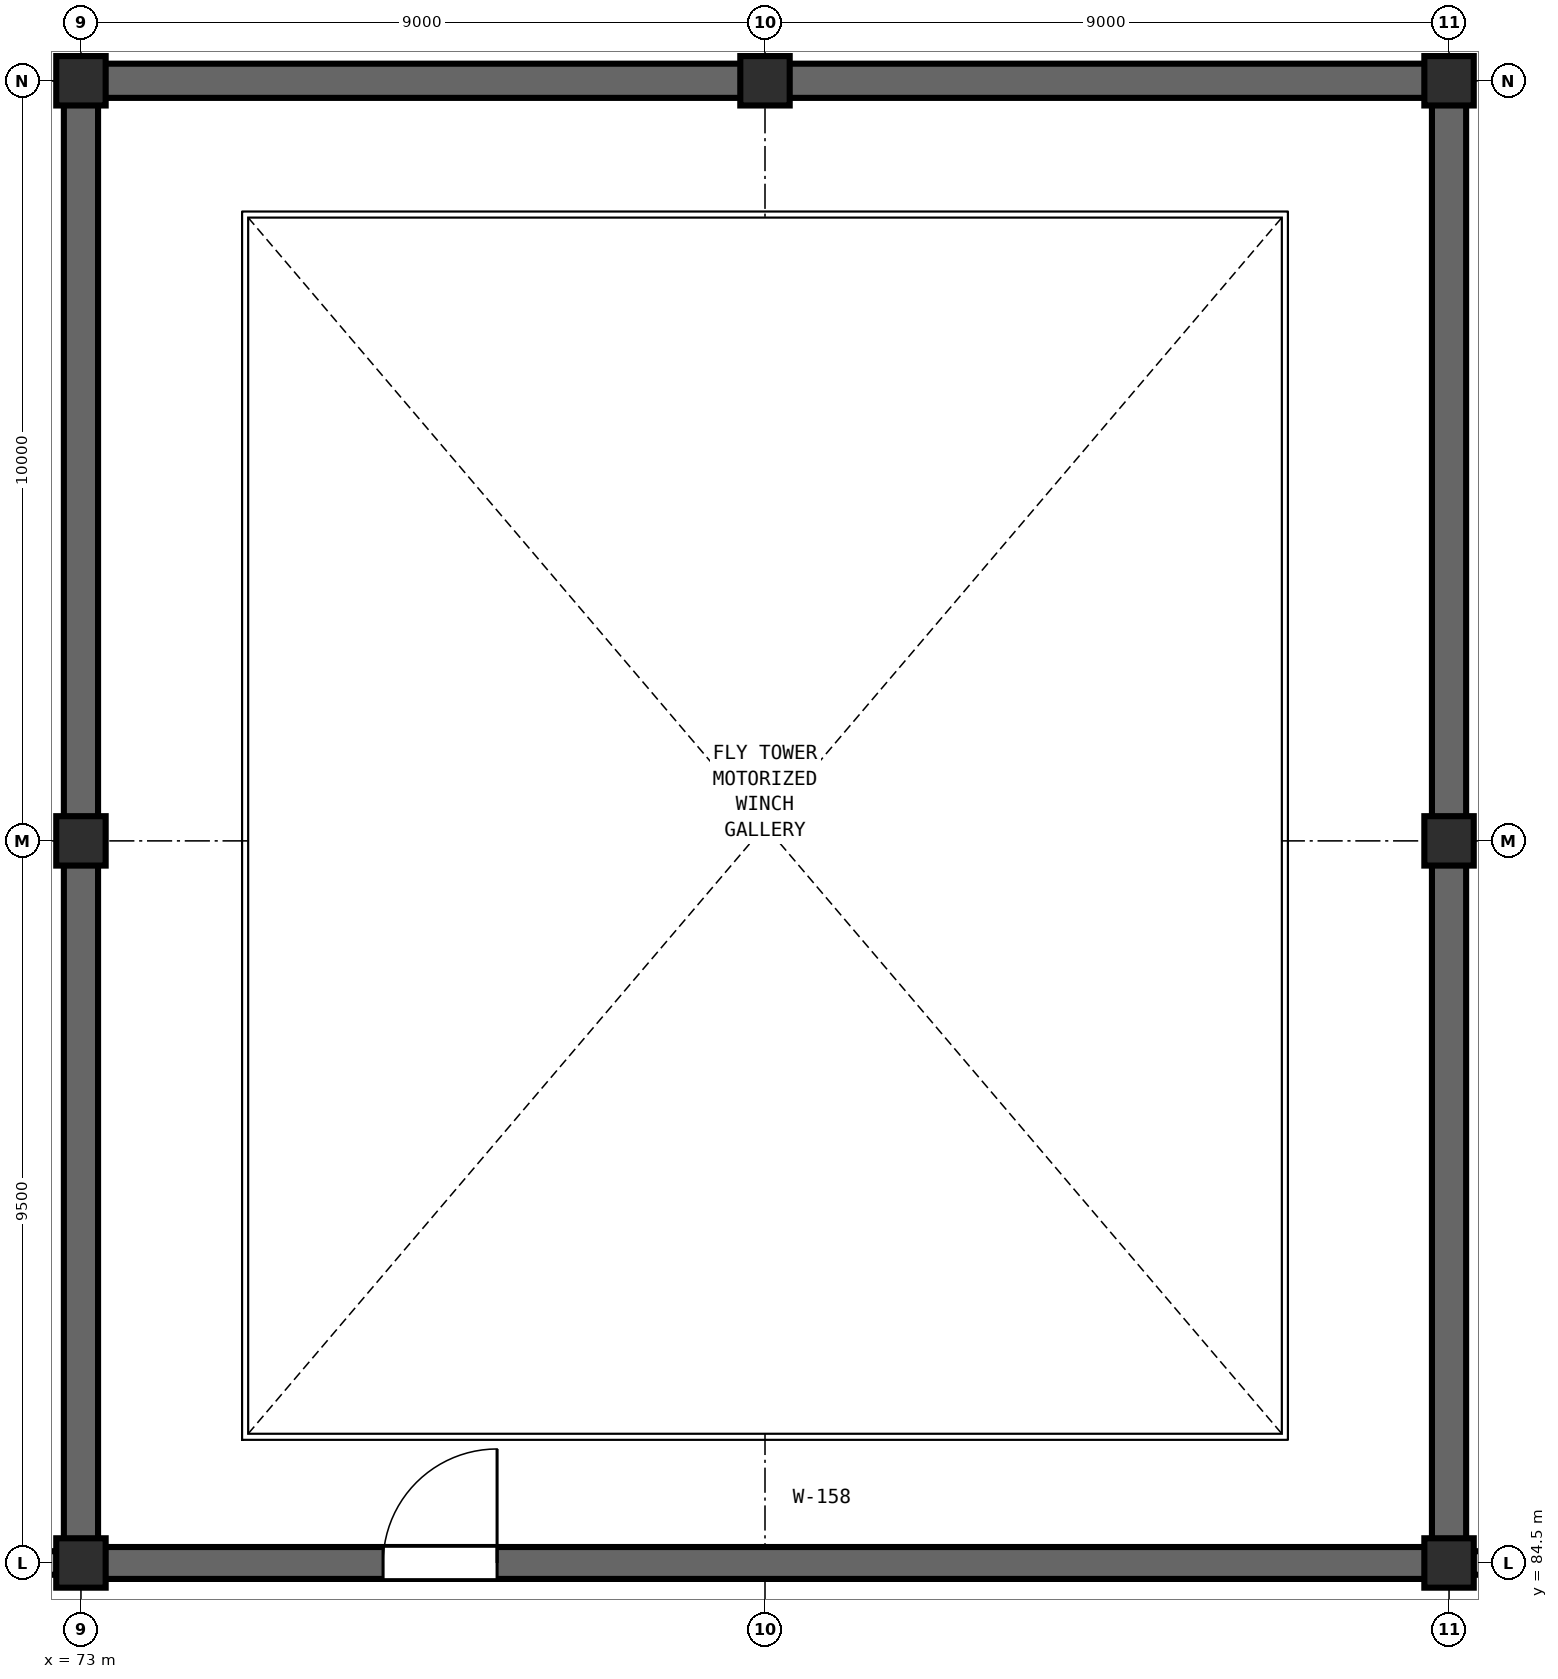
"""IFC4 building model, lengths in metres.
Left out: names, types, materials, properties, quantities, classifications, styles, units other than length and angle.
Written with IfcOpenShell. Run it as: python <this file> out.ifc"""

import sys

from ifc_helpers import new_model, si_unit, direction, frame, frame_2d, origin, origin_2d, place, context, subcontext, project, spatial, rectangle, extrude, element, fill, save


model = new_model("IFC4")
c1 = context("Model", 3, precision=1e-05, world=origin(), true_north=direction((0.0, 1.0)))
c2 = subcontext(c1, "Body", "Model", "MODEL_VIEW")
j1 = project(units=[si_unit("LENGTHUNIT", "METRE"), si_unit("PLANEANGLEUNIT", "RADIAN")], contexts=[c1])
p1 = place(None, origin())
s1 = spatial("IfcSite", under=j1, at=p1, CompositionType="ELEMENT")
p2 = place(p1, origin())
s2 = spatial("IfcBuilding", under=s1, at=p2, CompositionType="ELEMENT")
p3 = place(p2, frame((0.0, 0.0, 19.2)))
s3 = spatial("IfcBuildingStorey", under=s2, at=p3, CompositionType="ELEMENT", Elevation=19.2)
for number, where, z_axis, x_axis in (
    (1, (73.0, 84.5, 0.0), (0.0, 0.0, 1.0), (1.0, 0.0, 0.0)),
    (2, (73.0, 94.0, 0.0), (0.0, 0.0, 1.0), (1.0, 0.0, 0.0)),
    (3, (73.0, 104.0, 0.0), (0.0, 0.0, 1.0), (1.0, 0.0, 0.0)),
    (4, (82.0, 104.0, 0.0), (0.0, 0.0, 1.0), (1.0, 0.0, 0.0)),
    (5, (91.0, 84.5, 0.0), (0.0, 0.0, 1.0), (1.0, 0.0, 0.0)),
    (6, (91.0, 94.0, 0.0), (0.0, 0.0, 1.0), (1.0, 0.0, 0.0)),
    (7, (91.0, 104.0, 0.0), (0.0, 0.0, 1.0), (1.0, 0.0, 0.0)),
):
    element("IfcColumn", number, at=place(p3, frame(where, z_axis=z_axis, x_axis=x_axis)), inside=s3, PredefinedType="COLUMN", context=c2, shape_type="SweptSolid", body=[
        extrude(rectangle(XDim=0.65, YDim=0.65, at=origin_2d()), origin(), (0.0, 0.0, 1.0), 4.25),
    ])
p4 = place(p3, frame((72.775, 104.0, 0.0), z_axis=(0.0, 0.0, 1.0), x_axis=(1.0, 0.0, 0.0)))
e8 = element("IfcWall", 8, at=p4, inside=s3, PredefinedType="SHEAR", context=c2, shape_type="SweptSolid", body=[
    extrude(rectangle(XDim=18.45, YDim=0.45, at=frame_2d((9.225, 0.0))), origin(), (0.0, 0.0, 1.0), 4.5),
])
p5 = place(p3, frame((72.775, 84.5, 0.0), z_axis=(0.0, 0.0, 1.0), x_axis=(1.0, 0.0, 0.0)))
e9 = element("IfcWall", 9, at=p5, inside=s3, PredefinedType="SHEAR", context=c2, shape_type="SweptSolid", body=[
    extrude(rectangle(XDim=18.45, YDim=0.42, at=frame_2d((9.225, 0.0))), origin(), (0.0, 0.0, 1.0), 4.5),
])
p6 = place(p5, frame((4.2, 0.0, 0.0)))
e10 = element("IfcOpeningElement", 10, at=p6, cuts=e9, PredefinedType="OPENING", context=c2, shape_type="SweptSolid", body=[
    extrude(rectangle(XDim=1.5, YDim=2.2, at=frame_2d((0.75, 1.1))), frame((0.0, 0.22, 0.0), z_axis=(0.0, -1.0, 0.0), x_axis=(1.0, 0.0, 0.0)), (0.0, 0.0, 1.0), 0.44),
])
for number, where, z_axis, x_axis in (
    (11, (73.0, 84.275, 0.0), (0.0, 0.0, 1.0), (0.0, 1.0, 0.0)),
    (12, (91.0, 84.275, 0.0), (0.0, 0.0, 1.0), (0.0, 1.0, 0.0)),
):
    element("IfcWall", number, at=place(p3, frame(where, z_axis=z_axis, x_axis=x_axis)), inside=s3, PredefinedType="SHEAR", context=c2, shape_type="SweptSolid", body=[
        extrude(rectangle(XDim=19.95, YDim=0.45, at=frame_2d((9.975, 0.0))), origin(), (0.0, 0.0, 1.0), 4.5),
    ])
p7 = place(p3, frame((64.321, 84.5, 0.0), z_axis=(0.0, 0.0, 1.0), x_axis=(1.0, 0.0, 0.0)))
e13 = element("IfcWall", 13, at=p7, inside=s3, PredefinedType="SOLIDWALL", context=c2, shape_type="SweptSolid", body=[
    extrude(rectangle(XDim=8.358, YDim=0.31, at=frame_2d((4.179, 0.0))), origin(), (0.0, 0.0, 1.0), 3.817),
])
p8 = place(p7, frame((3.479, 0.0, 0.85)))
e14 = element("IfcOpeningElement", 14, at=p8, cuts=e13, PredefinedType="OPENING", context=c2, shape_type="SweptSolid", body=[
    extrude(rectangle(XDim=1.4, YDim=1.65, at=frame_2d((0.7, 0.825))), frame((0.0, 0.165, 0.0), z_axis=(0.0, -1.0, 0.0), x_axis=(1.0, 0.0, 0.0)), (0.0, 0.0, 1.0), 0.33),
])
p9 = place(p3, frame((91.321, 84.5, 0.0), z_axis=(0.0, 0.0, 1.0), x_axis=(1.0, 0.0, 0.0)))
e15 = element("IfcWall", 15, at=p9, inside=s3, PredefinedType="SOLIDWALL", context=c2, shape_type="SweptSolid", body=[
    extrude(rectangle(XDim=8.358, YDim=0.31, at=frame_2d((4.179, 0.0))), origin(), (0.0, 0.0, 1.0), 3.613),
])
p10 = place(p9, frame((3.479, 0.0, 0.85)))
e16 = element("IfcOpeningElement", 16, at=p10, cuts=e15, PredefinedType="OPENING", context=c2, shape_type="SweptSolid", body=[
    extrude(rectangle(XDim=1.4, YDim=1.65, at=frame_2d((0.7, 0.825))), frame((0.0, 0.165, 0.0), z_axis=(0.0, -1.0, 0.0), x_axis=(1.0, 0.0, 0.0)), (0.0, 0.0, 1.0), 0.33),
])
p11 = place(p6, origin())
e17 = element("IfcDoor", 17, at=p11, inside=s3, OperationType="SINGLE_SWING_RIGHT", PredefinedType="DOOR", context=c2, shape_type="SweptSolid", body=[
    extrude(rectangle(XDim=1.5, YDim=2.2, at=frame_2d((0.75, 1.1))), frame((0.0, 0.025, 0.0), z_axis=(0.0, -1.0, 0.0), x_axis=(1.0, 0.0, 0.0)), (0.0, 0.0, 1.0), 0.05),
])
fill(e10, e17)
save(model, sys.argv[1])
